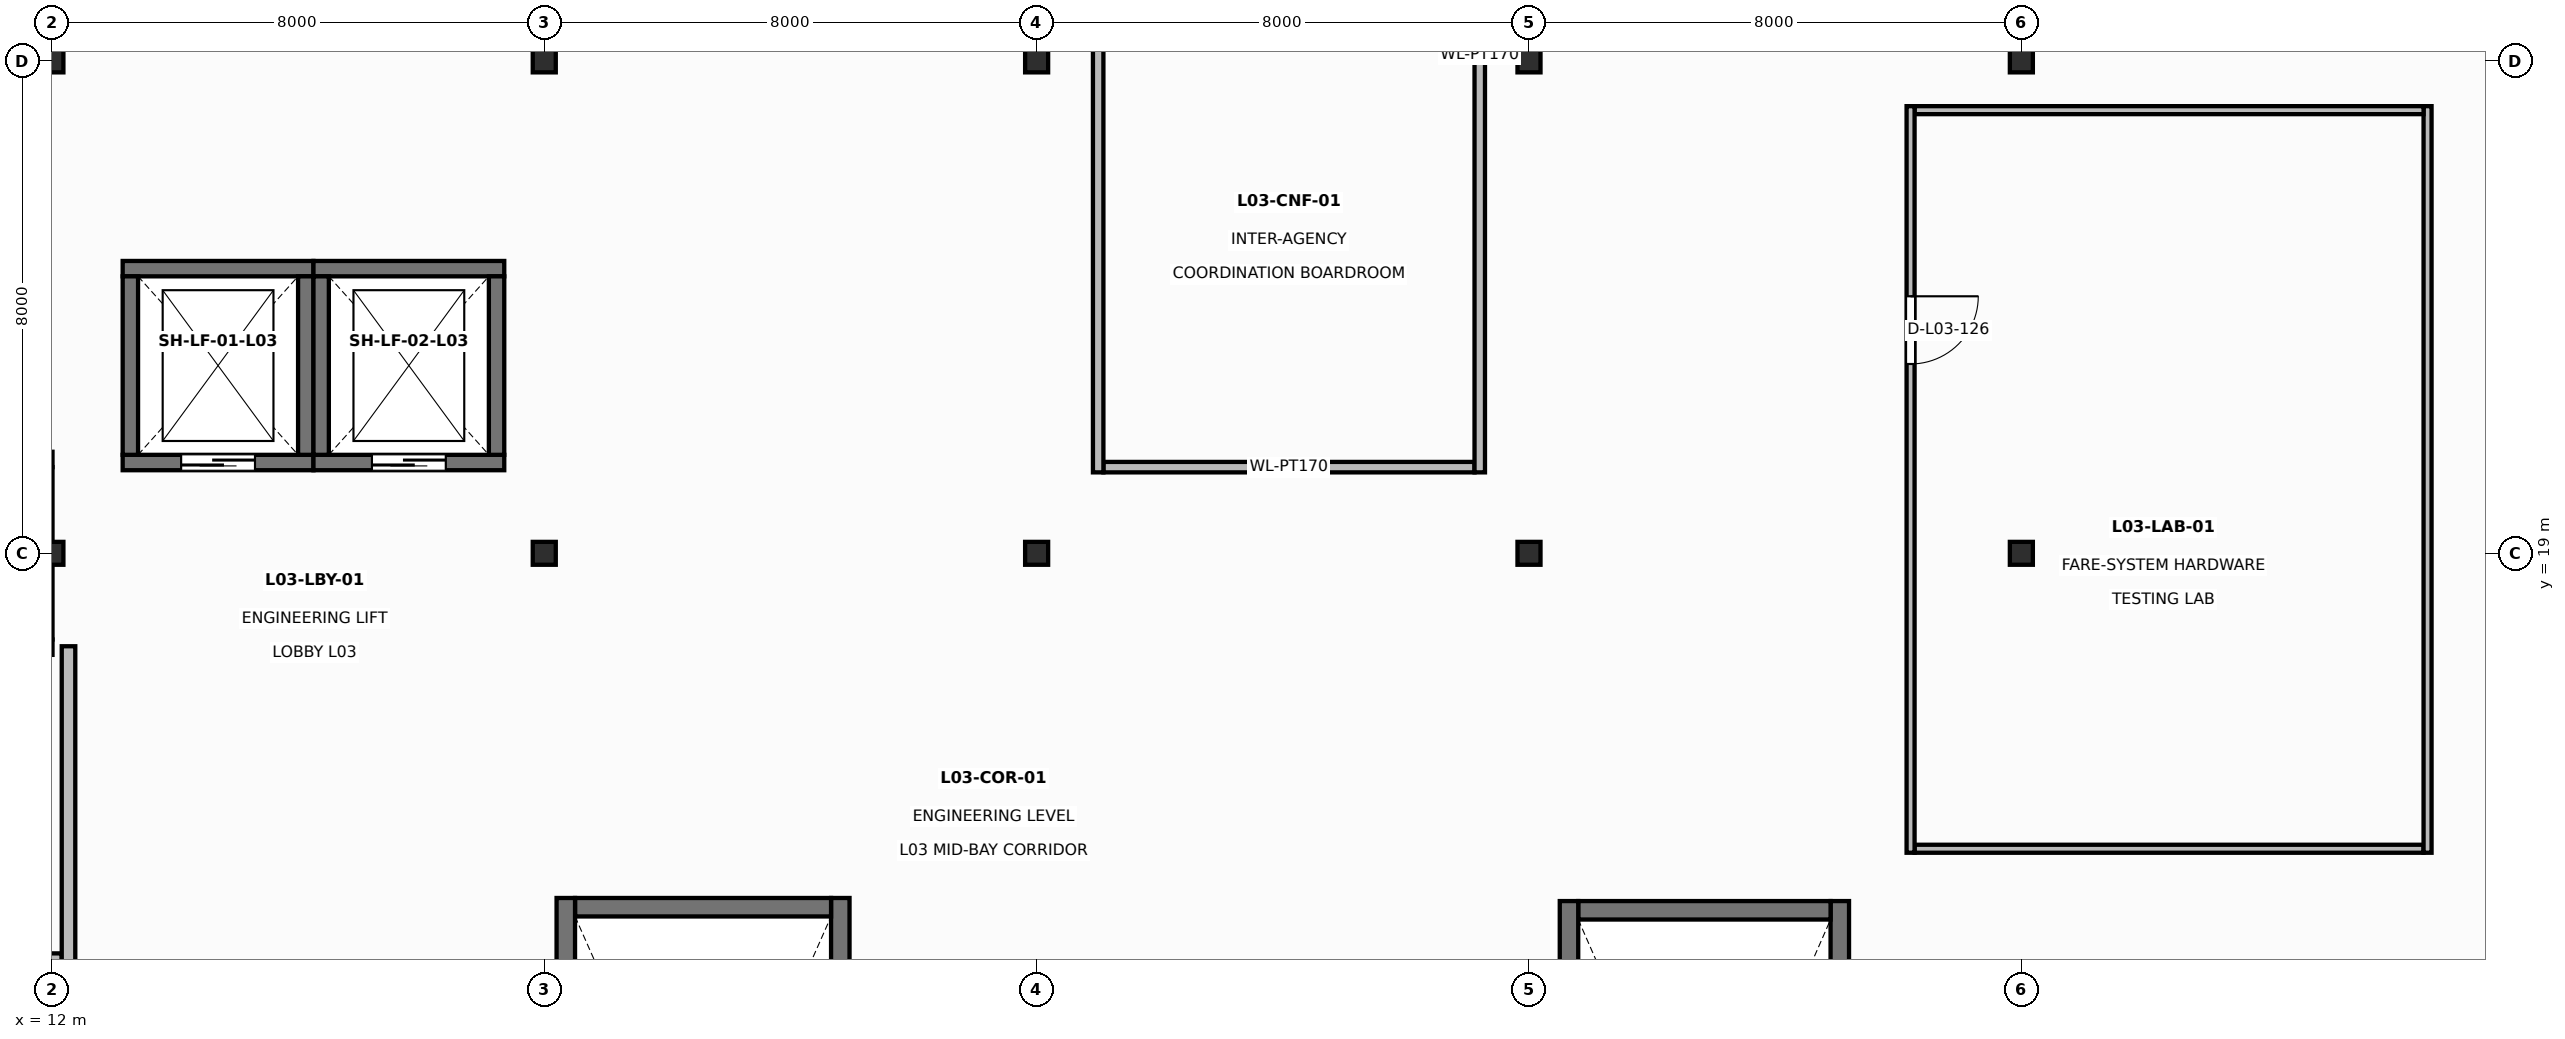
"""IFC4 building model, lengths in metres.
Left out: names, types, materials, properties, quantities, classifications, styles, units other than length and angle.
Written with IfcOpenShell. Run it as: python <this file> out.ifc"""

import sys

from ifc_helpers import new_model, si_unit, direction, frame, frame_2d, origin, origin_2d, place, context, subcontext, project, spatial, rectangle, i_section, extrude, element, fill, save


model = new_model("IFC4")
c1 = context("Model", 3, precision=1e-05, world=origin(), true_north=direction((0.0, 1.0)))
c2 = subcontext(c1, "Body", "Model", "MODEL_VIEW")
j1 = project(units=[si_unit("LENGTHUNIT", "METRE"), si_unit("PLANEANGLEUNIT", "RADIAN")], contexts=[c1])
p1 = place(None, origin())
s1 = spatial("IfcSite", under=j1, at=p1, CompositionType="ELEMENT")
p2 = place(p1, origin())
s2 = spatial("IfcBuilding", under=s1, at=p2, CompositionType="ELEMENT")
p3 = place(p2, frame((0.0, 0.0, 15.6)))
s3 = spatial("IfcBuildingStorey", under=s2, at=p3, CompositionType="ELEMENT", Elevation=15.6)
for number, where, z_axis, x_axis in (
    (1, (12.0, 19.0, 0.0), (0.0, 0.0, 1.0), (1.0, 0.0, 0.0)),
    (2, (12.0, 27.0, 0.0), (0.0, 0.0, 1.0), (1.0, 0.0, 0.0)),
    (3, (20.0, 19.0, 0.0), (0.0, 0.0, 1.0), (1.0, 0.0, 0.0)),
    (4, (20.0, 27.0, 0.0), (0.0, 0.0, 1.0), (1.0, 0.0, 0.0)),
    (5, (28.0, 19.0, 0.0), (0.0, 0.0, 1.0), (1.0, 0.0, 0.0)),
    (6, (28.0, 27.0, 0.0), (0.0, 0.0, 1.0), (1.0, 0.0, 0.0)),
    (7, (36.0, 19.0, 0.0), (0.0, 0.0, 1.0), (1.0, 0.0, 0.0)),
    (8, (36.0, 27.0, 0.0), (0.0, 0.0, 1.0), (1.0, 0.0, 0.0)),
    (9, (44.0, 19.0, 0.0), (0.0, 0.0, 1.0), (1.0, 0.0, 0.0)),
    (10, (44.0, 27.0, 0.0), (0.0, 0.0, 1.0), (1.0, 0.0, 0.0)),
):
    element("IfcColumn", number, at=place(p3, frame(where, z_axis=z_axis, x_axis=x_axis)), inside=s3, PredefinedType="COLUMN", context=c2, shape_type="SweptSolid", body=[
        extrude(i_section(OverallWidth=0.374, OverallDepth=0.372, WebThickness=0.016, FlangeThickness=0.026, at=origin_2d()), origin(), (0.0, 0.0, 1.0), 4.2),
    ])
p4 = place(p3, frame((24.81, 3.4, 0.0), z_axis=(0.0, 0.0, 1.0), x_axis=(0.0, 1.0, 0.0)))
e11 = element("IfcWall", 11, at=p4, inside=s3, PredefinedType="SHEAR", context=c2, shape_type="SweptSolid", body=[
    extrude(rectangle(XDim=10.0, YDim=0.3, at=frame_2d((5.0, 0.0))), origin(), (0.0, 0.0, 1.0), 3.975),
])
p5 = place(p4, frame((0.75, 0.0, 0.0)))
e12 = element("IfcOpeningElement", 12, at=p5, cuts=e11, PredefinedType="OPENING", context=c2, shape_type="SweptSolid", body=[
    extrude(rectangle(XDim=1.1, YDim=2.15, at=frame_2d((0.55, 1.075))), frame((0.0, 0.16, 0.0), z_axis=(0.0, -1.0, 0.0), x_axis=(1.0, 0.0, 0.0)), (0.0, 0.0, 1.0), 0.32),
])
p6 = place(p3, frame((24.66, 13.25, 0.0), z_axis=(0.0, 0.0, 1.0), x_axis=(-1.0, 0.0, 0.0)))
e13 = element("IfcWall", 13, at=p6, inside=s3, PredefinedType="SHEAR", context=c2, shape_type="SweptSolid", body=[
    extrude(rectangle(XDim=4.16, YDim=0.3, at=frame_2d((2.08, 0.0))), origin(), (0.0, 0.0, 1.0), 3.975),
])
p7 = place(p3, frame((20.35, 13.4, 0.0), z_axis=(0.0, 0.0, 1.0), x_axis=(0.0, -1.0, 0.0)))
e14 = element("IfcWall", 14, at=p7, inside=s3, PredefinedType="SHEAR", context=c2, shape_type="SweptSolid", body=[
    extrude(rectangle(XDim=10.0, YDim=0.3, at=frame_2d((5.0, 0.0))), origin(), (0.0, 0.0, 1.0), 3.975),
])
p8 = place(p3, frame((41.05, 3.4, 0.0), z_axis=(0.0, 0.0, 1.0), x_axis=(0.0, 1.0, 0.0)))
e15 = element("IfcWall", 15, at=p8, inside=s3, PredefinedType="SHEAR", context=c2, shape_type="SweptSolid", body=[
    extrude(rectangle(XDim=9.95, YDim=0.3, at=frame_2d((4.975, 0.0))), origin(), (0.0, 0.0, 1.0), 3.975),
])
p9 = place(p8, frame((0.75, 0.0, 0.0)))
e16 = element("IfcOpeningElement", 16, at=p9, cuts=e15, PredefinedType="OPENING", context=c2, shape_type="SweptSolid", body=[
    extrude(rectangle(XDim=1.1, YDim=2.15, at=frame_2d((0.55, 1.075))), frame((0.0, 0.16, 0.0), z_axis=(0.0, -1.0, 0.0), x_axis=(1.0, 0.0, 0.0)), (0.0, 0.0, 1.0), 0.32),
])
p10 = place(p3, frame((40.9, 13.2, 0.0), z_axis=(0.0, 0.0, 1.0), x_axis=(-1.0, 0.0, 0.0)))
e17 = element("IfcWall", 17, at=p10, inside=s3, PredefinedType="SHEAR", context=c2, shape_type="SweptSolid", body=[
    extrude(rectangle(XDim=4.1, YDim=0.3, at=frame_2d((2.05, 0.0))), origin(), (0.0, 0.0, 1.0), 3.975),
])
p11 = place(p3, frame((36.65, 13.35, 0.0), z_axis=(0.0, 0.0, 1.0), x_axis=(0.0, -1.0, 0.0)))
e18 = element("IfcWall", 18, at=p11, inside=s3, PredefinedType="SHEAR", context=c2, shape_type="SweptSolid", body=[
    extrude(rectangle(XDim=9.95, YDim=0.3, at=frame_2d((4.975, 0.0))), origin(), (0.0, 0.0, 1.0), 3.975),
])
p12 = place(p3, frame((9.11, 17.475, 0.0), z_axis=(0.0, 0.0, 1.0), x_axis=(1.0, 0.0, 0.0)))
e19 = element("IfcWall", 19, at=p12, inside=s3, PredefinedType="SOLIDWALL", context=c2, shape_type="SweptSolid", body=[
    extrude(rectangle(XDim=2.9, YDim=0.25, at=frame_2d((1.45, 0.0))), origin(), (0.0, 0.0, 1.0), 3.975),
])
p13 = place(p12, frame((0.75, 0.0, 0.0)))
e20 = element("IfcOpeningElement", 20, at=p13, cuts=e19, PredefinedType="OPENING", context=c2, shape_type="SweptSolid", body=[
    extrude(rectangle(XDim=1.4, YDim=2.25, at=frame_2d((0.7, 1.125))), frame((0.0, 0.135, 0.0), z_axis=(0.0, -1.0, 0.0), x_axis=(1.0, 0.0, 0.0)), (0.0, 0.0, 1.0), 0.27),
])
p14 = place(p3, frame((12.01, 20.525, 0.0), z_axis=(0.0, 0.0, 1.0), x_axis=(-1.0, 0.0, 0.0)))
e21 = element("IfcWall", 21, at=p14, inside=s3, PredefinedType="SOLIDWALL", context=c2, shape_type="SweptSolid", body=[
    extrude(rectangle(XDim=2.9, YDim=0.25, at=frame_2d((1.45, 0.0))), origin(), (0.0, 0.0, 1.0), 3.975),
])
p15 = place(p3, frame((11.885, 17.6, 0.0), z_axis=(0.0, 0.0, 1.0), x_axis=(0.0, 1.0, 0.0)))
e22 = element("IfcWall", 22, at=p15, inside=s3, PredefinedType="SOLIDWALL", context=c2, shape_type="SweptSolid", body=[
    extrude(rectangle(XDim=2.8, YDim=0.25, at=frame_2d((1.4, 0.0))), origin(), (0.0, 0.0, 1.0), 3.975),
])
p16 = place(p3, frame((9.12, 12.39, 0.0), z_axis=(0.0, 0.0, 1.0), x_axis=(1.0, 0.0, 0.0)))
e23 = element("IfcWall", 23, at=p16, inside=s3, PredefinedType="SOLIDWALL", context=c2, shape_type="SweptSolid", body=[
    extrude(rectangle(XDim=3.04, YDim=0.22, at=frame_2d((1.52, 0.0))), origin(), (0.0, 0.0, 1.0), 3.358),
])
p17 = place(p16, frame((0.805, 0.0, 0.0)))
e24 = element("IfcOpeningElement", 24, at=p17, cuts=e23, PredefinedType="OPENING", context=c2, shape_type="SweptSolid", body=[
    extrude(rectangle(XDim=1.15, YDim=2.15, at=frame_2d((0.575, 1.075))), frame((0.0, 0.12, 0.0), z_axis=(0.0, -1.0, 0.0), x_axis=(1.0, 0.0, 0.0)), (0.0, 0.0, 1.0), 0.24),
])
p18 = place(p3, frame((12.27, 12.28, 0.0), z_axis=(0.0, 0.0, 1.0), x_axis=(0.0, 1.0, 0.0)))
e25 = element("IfcWall", 25, at=p18, inside=s3, PredefinedType="SOLIDWALL", context=c2, shape_type="SweptSolid", body=[
    extrude(rectangle(XDim=5.21, YDim=0.22, at=frame_2d((2.605, 0.0))), origin(), (0.0, 0.0, 1.0), 3.975),
])
p19 = place(p3, frame((13.15, 20.475, 0.0), z_axis=(0.0, 0.0, 1.0), x_axis=(1.0, 0.0, 0.0)))
e26 = element("IfcWall", 26, at=p19, inside=s3, PredefinedType="SOLIDWALL", context=c2, shape_type="SweptSolid", body=[
    extrude(rectangle(XDim=3.1, YDim=0.25, at=frame_2d((1.55, 0.0))), origin(), (0.0, 0.0, 1.0), 3.975),
])
p20 = place(p19, frame((0.95, 0.0, 0.0)))
e27 = element("IfcOpeningElement", 27, at=p20, cuts=e26, PredefinedType="OPENING", context=c2, shape_type="SweptSolid", body=[
    extrude(rectangle(XDim=1.2, YDim=2.2, at=frame_2d((0.6, 1.1))), frame((0.0, 0.135, 0.0), z_axis=(0.0, -1.0, 0.0), x_axis=(1.0, 0.0, 0.0)), (0.0, 0.0, 1.0), 0.27),
])
p21 = place(p3, frame((16.25, 23.625, 0.0), z_axis=(0.0, 0.0, 1.0), x_axis=(-1.0, 0.0, 0.0)))
e28 = element("IfcWall", 28, at=p21, inside=s3, PredefinedType="SOLIDWALL", context=c2, shape_type="SweptSolid", body=[
    extrude(rectangle(XDim=3.1, YDim=0.25, at=frame_2d((1.55, 0.0))), origin(), (0.0, 0.0, 1.0), 3.975),
])
for number, where, z_axis, x_axis in (
    (29, (16.125, 20.6, 0.0), (0.0, 0.0, 1.0), (0.0, 1.0, 0.0)),
    (30, (13.275, 23.5, 0.0), (0.0, 0.0, 1.0), (0.0, -1.0, 0.0)),
):
    element("IfcWall", number, at=place(p3, frame(where, z_axis=z_axis, x_axis=x_axis)), inside=s3, PredefinedType="SOLIDWALL", context=c2, shape_type="SweptSolid", body=[
        extrude(rectangle(XDim=2.9, YDim=0.25, at=frame_2d((1.45, 0.0))), origin(), (0.0, 0.0, 1.0), 3.975),
    ])
p22 = place(p3, frame((16.25, 20.475, 0.0), z_axis=(0.0, 0.0, 1.0), x_axis=(1.0, 0.0, 0.0)))
e31 = element("IfcWall", 31, at=p22, inside=s3, PredefinedType="SOLIDWALL", context=c2, shape_type="SweptSolid", body=[
    extrude(rectangle(XDim=3.1, YDim=0.25, at=frame_2d((1.55, 0.0))), origin(), (0.0, 0.0, 1.0), 3.975),
])
p23 = place(p22, frame((0.95, 0.0, 0.0)))
e32 = element("IfcOpeningElement", 32, at=p23, cuts=e31, PredefinedType="OPENING", context=c2, shape_type="SweptSolid", body=[
    extrude(rectangle(XDim=1.2, YDim=2.2, at=frame_2d((0.6, 1.1))), frame((0.0, 0.135, 0.0), z_axis=(0.0, -1.0, 0.0), x_axis=(1.0, 0.0, 0.0)), (0.0, 0.0, 1.0), 0.27),
])
p24 = place(p3, frame((19.35, 23.625, 0.0), z_axis=(0.0, 0.0, 1.0), x_axis=(-1.0, 0.0, 0.0)))
e33 = element("IfcWall", 33, at=p24, inside=s3, PredefinedType="SOLIDWALL", context=c2, shape_type="SweptSolid", body=[
    extrude(rectangle(XDim=3.1, YDim=0.25, at=frame_2d((1.55, 0.0))), origin(), (0.0, 0.0, 1.0), 3.975),
])
for number, where, z_axis, x_axis in (
    (34, (19.225, 20.6, 0.0), (0.0, 0.0, 1.0), (0.0, 1.0, 0.0)),
    (35, (16.375, 23.5, 0.0), (0.0, 0.0, 1.0), (0.0, -1.0, 0.0)),
):
    element("IfcWall", number, at=place(p3, frame(where, z_axis=z_axis, x_axis=x_axis)), inside=s3, PredefinedType="SOLIDWALL", context=c2, shape_type="SweptSolid", body=[
        extrude(rectangle(XDim=2.9, YDim=0.25, at=frame_2d((1.45, 0.0))), origin(), (0.0, 0.0, 1.0), 3.975),
    ])
p25 = place(p3, frame((42.265, 14.2, 0.0), z_axis=(0.0, 0.0, 1.0), x_axis=(1.0, 0.0, 0.0)))
e36 = element("IfcWall", 36, at=p25, inside=s3, PredefinedType="PARTITIONING", context=c2, shape_type="SweptSolid", body=[
    extrude(rectangle(XDim=8.27, YDim=0.13, at=frame_2d((4.135, 0.0))), origin(), (0.0, 0.0, 1.0), 3.9),
])
p26 = place(p3, frame((50.6, 14.135, 0.0), z_axis=(0.0, 0.0, 1.0), x_axis=(0.0, 1.0, 0.0)))
e37 = element("IfcWall", 37, at=p26, inside=s3, PredefinedType="PARTITIONING", context=c2, shape_type="SweptSolid", body=[
    extrude(rectangle(XDim=12.13, YDim=0.13, at=frame_2d((6.065, 0.0))), origin(), (0.0, 0.0, 1.0), 3.115),
])
p27 = place(p3, frame((50.535, 26.2, 0.0), z_axis=(0.0, 0.0, 1.0), x_axis=(-1.0, 0.0, 0.0)))
e38 = element("IfcWall", 38, at=p27, inside=s3, PredefinedType="PARTITIONING", context=c2, shape_type="SweptSolid", body=[
    extrude(rectangle(XDim=8.27, YDim=0.13, at=frame_2d((4.135, 0.0))), origin(), (0.0, 0.0, 1.0), 3.9),
])
p28 = place(p3, frame((42.2, 26.265, 0.0), z_axis=(0.0, 0.0, 1.0), x_axis=(0.0, -1.0, 0.0)))
e39 = element("IfcWall", 39, at=p28, inside=s3, PredefinedType="PARTITIONING", context=c2, shape_type="SweptSolid", body=[
    extrude(rectangle(XDim=12.13, YDim=0.13, at=frame_2d((6.065, 0.0))), origin(), (0.0, 0.0, 1.0), 3.115),
])
p29 = place(p28, frame((3.089, 0.0, 0.0)))
e40 = element("IfcOpeningElement", 40, at=p29, cuts=e39, PredefinedType="OPENING", context=c2, shape_type="SweptSolid", body=[
    extrude(rectangle(XDim=1.1, YDim=2.18, at=frame_2d((0.55, 1.09))), frame((0.0, 0.075, 0.0), z_axis=(0.0, -1.0, 0.0), x_axis=(1.0, 0.0, 0.0)), (0.0, 0.0, 1.0), 0.15),
])
p30 = place(p3, frame((29.085, 20.4, 0.0), z_axis=(0.0, 0.0, 1.0), x_axis=(1.0, 0.0, 0.0)))
e41 = element("IfcWall", 41, at=p30, inside=s3, PredefinedType="PARTITIONING", context=c2, shape_type="SweptSolid", body=[
    extrude(rectangle(XDim=6.03, YDim=0.17, at=frame_2d((3.015, 0.0))), origin(), (0.0, 0.0, 1.0), 3.9),
])
p31 = place(p3, frame((35.2, 20.315, 0.0), z_axis=(0.0, 0.0, 1.0), x_axis=(0.0, 1.0, 0.0)))
e42 = element("IfcWall", 42, at=p31, inside=s3, PredefinedType="PARTITIONING", context=c2, shape_type="SweptSolid", body=[
    extrude(rectangle(XDim=13.57, YDim=0.17, at=frame_2d((6.785, 0.0))), origin(), (0.0, 0.0, 1.0), 3.196),
])
p32 = place(p3, frame((29.0, 33.885, 0.0), z_axis=(0.0, 0.0, 1.0), x_axis=(0.0, -1.0, 0.0)))
e43 = element("IfcWall", 43, at=p32, inside=s3, PredefinedType="PARTITIONING", context=c2, shape_type="SweptSolid", body=[
    extrude(rectangle(XDim=13.57, YDim=0.17, at=frame_2d((6.785, 0.0))), origin(), (0.0, 0.0, 1.0), 3.196),
])
p33 = place(p32, frame((3.551, 0.0, 0.0)))
e44 = element("IfcOpeningElement", 44, at=p33, cuts=e43, PredefinedType="OPENING", context=c2, shape_type="SweptSolid", body=[
    extrude(rectangle(XDim=1.04, YDim=2.16, at=frame_2d((0.52, 1.08))), frame((0.0, 0.095, 0.0), z_axis=(0.0, -1.0, 0.0), x_axis=(1.0, 0.0, 0.0)), (0.0, 0.0, 1.0), 0.19),
])
p34 = place(p20, frame((1.2, 0.0, 0.0), z_axis=(0.0, 0.0, 1.0), x_axis=(-1.0, 0.0, 0.0)))
e45 = element("IfcDoor", 45, at=p34, inside=s3, OperationType="DOUBLE_DOOR_SLIDING", PredefinedType="DOOR", context=c2, shape_type="SweptSolid", body=[
    extrude(rectangle(XDim=1.2, YDim=2.2, at=frame_2d((0.6, 1.1))), frame((0.0, 0.025, 0.0), z_axis=(0.0, -1.0, 0.0), x_axis=(1.0, 0.0, 0.0)), (0.0, 0.0, 1.0), 0.05),
])
fill(e27, e45)
p35 = place(p23, frame((1.2, 0.0, 0.0), z_axis=(0.0, 0.0, 1.0), x_axis=(-1.0, 0.0, 0.0)))
e46 = element("IfcDoor", 46, at=p35, inside=s3, OperationType="DOUBLE_DOOR_SLIDING", PredefinedType="DOOR", context=c2, shape_type="SweptSolid", body=[
    extrude(rectangle(XDim=1.2, YDim=2.2, at=frame_2d((0.6, 1.1))), frame((0.0, 0.025, 0.0), z_axis=(0.0, -1.0, 0.0), x_axis=(1.0, 0.0, 0.0)), (0.0, 0.0, 1.0), 0.05),
])
fill(e32, e46)
p36 = place(p29, origin())
e47 = element("IfcDoor", 47, at=p36, inside=s3, OperationType="SINGLE_SWING_LEFT", PredefinedType="DOOR", context=c2, shape_type="SweptSolid", body=[
    extrude(rectangle(XDim=1.1, YDim=2.18, at=frame_2d((0.55, 1.09))), frame((0.0, 0.025, 0.0), z_axis=(0.0, -1.0, 0.0), x_axis=(1.0, 0.0, 0.0)), (0.0, 0.0, 1.0), 0.05),
])
fill(e40, e47)
save(model, sys.argv[1])
